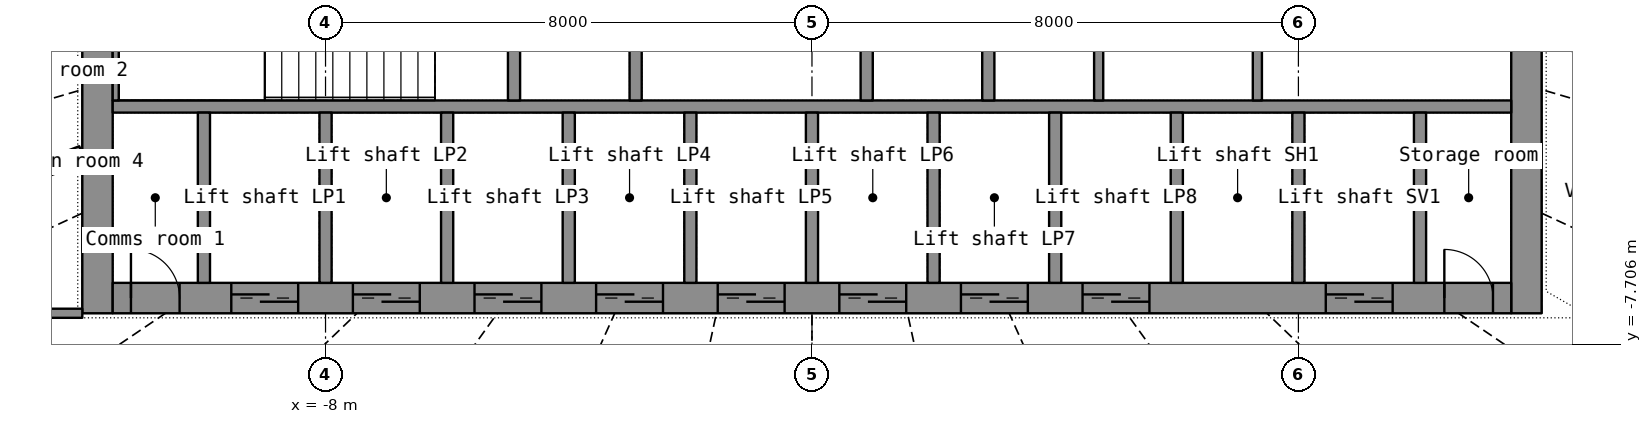
"""IFC4 building model, lengths in metres.
Left out: names, types, materials, properties, quantities, classifications, styles, units other than length and angle.
Written with IfcOpenShell. Run it as: python <this file> out.ifc"""

import sys

from ifc_helpers import new_model, si_unit, direction, frame, frame_2d, origin, place, context, subcontext, project, spatial, rectangle, extrude, element, fill, save


model = new_model("IFC4")
c1 = context("Model", 3, precision=1e-05, world=origin(), true_north=direction((0.0, 1.0)))
c2 = subcontext(c1, "Body", "Model", "MODEL_VIEW")
j1 = project(units=[si_unit("LENGTHUNIT", "METRE"), si_unit("PLANEANGLEUNIT", "RADIAN")], contexts=[c1])
p1 = place(None, origin())
s1 = spatial("IfcSite", under=j1, at=p1, CompositionType="ELEMENT")
p2 = place(p1, origin())
s2 = spatial("IfcBuilding", under=s1, at=p2, CompositionType="ELEMENT")
p3 = place(p2, frame((0.0, 0.0, 134.1)))
s3 = spatial("IfcBuildingStorey", under=s2, at=p3, CompositionType="ELEMENT", Elevation=134.1)
p4 = place(p3, frame((-11.75, -7.2, 0.0), z_axis=(0.0, 0.0, 1.0), x_axis=(0.0, 1.0, 0.0)))
e1 = element("IfcWall", 1, at=p4, inside=s3, PredefinedType="SHEAR", context=c2, shape_type="SweptSolid", body=[
    extrude(rectangle(XDim=14.4, YDim=0.5, at=frame_2d((7.2, 0.0))), origin(), (0.0, 0.0, 1.0), 3.3),
])
p5 = place(p4, frame((6.5, 0.0, 0.0)))
e2 = element("IfcOpeningElement", 2, at=p5, cuts=e1, PredefinedType="OPENING", context=c2, shape_type="SweptSolid", body=[
    extrude(rectangle(XDim=1.4, YDim=2.2, at=frame_2d((0.7, 1.1))), frame((0.0, 0.26, 0.0), z_axis=(0.0, -1.0, 0.0), x_axis=(1.0, 0.0, 0.0)), (0.0, 0.0, 1.0), 0.52),
])
p6 = place(p3, frame((11.75, -7.2, 0.0), z_axis=(0.0, 0.0, 1.0), x_axis=(0.0, 1.0, 0.0)))
e3 = element("IfcWall", 3, at=p6, inside=s3, PredefinedType="SHEAR", context=c2, shape_type="SweptSolid", body=[
    extrude(rectangle(XDim=14.4, YDim=0.5, at=frame_2d((7.2, 0.0))), origin(), (0.0, 0.0, 1.0), 3.3),
])
p7 = place(p6, frame((6.5, 0.0, 0.0)))
e4 = element("IfcOpeningElement", 4, at=p7, cuts=e3, PredefinedType="OPENING", context=c2, shape_type="SweptSolid", body=[
    extrude(rectangle(XDim=1.4, YDim=2.2, at=frame_2d((0.7, 1.1))), frame((0.0, 0.26, 0.0), z_axis=(0.0, -1.0, 0.0), x_axis=(1.0, 0.0, 0.0)), (0.0, 0.0, 1.0), 0.52),
])
p8 = place(p3, frame((-11.5, -6.95, 0.0), z_axis=(0.0, 0.0, 1.0), x_axis=(1.0, 0.0, 0.0)))
e5 = element("IfcWall", 5, at=p8, inside=s3, PredefinedType="SHEAR", context=c2, shape_type="SweptSolid", body=[
    extrude(rectangle(XDim=23.0, YDim=0.5, at=frame_2d((11.5, 0.0))), origin(), (0.0, 0.0, 1.0), 3.3),
])
p9 = place(p8, frame((1.95, 0.0, 0.0)))
e6 = element("IfcOpeningElement", 6, at=p9, cuts=e5, PredefinedType="OPENING", context=c2, shape_type="SweptSolid", body=[
    extrude(rectangle(XDim=1.1, YDim=2.2, at=frame_2d((0.55, 1.1))), frame((0.0, 0.26, 0.0), z_axis=(0.0, -1.0, 0.0), x_axis=(1.0, 0.0, 0.0)), (0.0, 0.0, 1.0), 0.52),
])
p10 = place(p8, frame((3.95, 0.0, 0.0)))
e7 = element("IfcOpeningElement", 7, at=p10, cuts=e5, PredefinedType="OPENING", context=c2, shape_type="SweptSolid", body=[
    extrude(rectangle(XDim=1.1, YDim=2.2, at=frame_2d((0.55, 1.1))), frame((0.0, 0.26, 0.0), z_axis=(0.0, -1.0, 0.0), x_axis=(1.0, 0.0, 0.0)), (0.0, 0.0, 1.0), 0.52),
])
p11 = place(p8, frame((5.95, 0.0, 0.0)))
e8 = element("IfcOpeningElement", 8, at=p11, cuts=e5, PredefinedType="OPENING", context=c2, shape_type="SweptSolid", body=[
    extrude(rectangle(XDim=1.1, YDim=2.2, at=frame_2d((0.55, 1.1))), frame((0.0, 0.26, 0.0), z_axis=(0.0, -1.0, 0.0), x_axis=(1.0, 0.0, 0.0)), (0.0, 0.0, 1.0), 0.52),
])
p12 = place(p8, frame((7.95, 0.0, 0.0)))
e9 = element("IfcOpeningElement", 9, at=p12, cuts=e5, PredefinedType="OPENING", context=c2, shape_type="SweptSolid", body=[
    extrude(rectangle(XDim=1.1, YDim=2.2, at=frame_2d((0.55, 1.1))), frame((0.0, 0.26, 0.0), z_axis=(0.0, -1.0, 0.0), x_axis=(1.0, 0.0, 0.0)), (0.0, 0.0, 1.0), 0.52),
])
p13 = place(p8, frame((9.95, 0.0, 0.0)))
e10 = element("IfcOpeningElement", 10, at=p13, cuts=e5, PredefinedType="OPENING", context=c2, shape_type="SweptSolid", body=[
    extrude(rectangle(XDim=1.1, YDim=2.2, at=frame_2d((0.55, 1.1))), frame((0.0, 0.26, 0.0), z_axis=(0.0, -1.0, 0.0), x_axis=(1.0, 0.0, 0.0)), (0.0, 0.0, 1.0), 0.52),
])
p14 = place(p8, frame((11.95, 0.0, 0.0)))
e11 = element("IfcOpeningElement", 11, at=p14, cuts=e5, PredefinedType="OPENING", context=c2, shape_type="SweptSolid", body=[
    extrude(rectangle(XDim=1.1, YDim=2.2, at=frame_2d((0.55, 1.1))), frame((0.0, 0.26, 0.0), z_axis=(0.0, -1.0, 0.0), x_axis=(1.0, 0.0, 0.0)), (0.0, 0.0, 1.0), 0.52),
])
p15 = place(p8, frame((13.95, 0.0, 0.0)))
e12 = element("IfcOpeningElement", 12, at=p15, cuts=e5, PredefinedType="OPENING", context=c2, shape_type="SweptSolid", body=[
    extrude(rectangle(XDim=1.1, YDim=2.2, at=frame_2d((0.55, 1.1))), frame((0.0, 0.26, 0.0), z_axis=(0.0, -1.0, 0.0), x_axis=(1.0, 0.0, 0.0)), (0.0, 0.0, 1.0), 0.52),
])
p16 = place(p8, frame((15.95, 0.0, 0.0)))
e13 = element("IfcOpeningElement", 13, at=p16, cuts=e5, PredefinedType="OPENING", context=c2, shape_type="SweptSolid", body=[
    extrude(rectangle(XDim=1.1, YDim=2.2, at=frame_2d((0.55, 1.1))), frame((0.0, 0.26, 0.0), z_axis=(0.0, -1.0, 0.0), x_axis=(1.0, 0.0, 0.0)), (0.0, 0.0, 1.0), 0.52),
])
p17 = place(p8, frame((19.95, 0.0, 0.0)))
e14 = element("IfcOpeningElement", 14, at=p17, cuts=e5, PredefinedType="OPENING", context=c2, shape_type="SweptSolid", body=[
    extrude(rectangle(XDim=1.1, YDim=2.2, at=frame_2d((0.55, 1.1))), frame((0.0, 0.26, 0.0), z_axis=(0.0, -1.0, 0.0), x_axis=(1.0, 0.0, 0.0)), (0.0, 0.0, 1.0), 0.52),
])
p18 = place(p8, frame((0.3, 0.0, 0.0)))
e15 = element("IfcOpeningElement", 15, at=p18, cuts=e5, PredefinedType="OPENING", context=c2, shape_type="SweptSolid", body=[
    extrude(rectangle(XDim=0.8, YDim=2.05, at=frame_2d((0.4, 1.025))), frame((0.0, 0.26, 0.0), z_axis=(0.0, -1.0, 0.0), x_axis=(1.0, 0.0, 0.0)), (0.0, 0.0, 1.0), 0.52),
])
p19 = place(p8, frame((21.9, 0.0, 0.0)))
e16 = element("IfcOpeningElement", 16, at=p19, cuts=e5, PredefinedType="OPENING", context=c2, shape_type="SweptSolid", body=[
    extrude(rectangle(XDim=0.8, YDim=2.05, at=frame_2d((0.4, 1.025))), frame((0.0, 0.26, 0.0), z_axis=(0.0, -1.0, 0.0), x_axis=(1.0, 0.0, 0.0)), (0.0, 0.0, 1.0), 0.52),
])
p20 = place(p3, frame((-11.5, -3.8, 0.0), z_axis=(0.0, 0.0, 1.0), x_axis=(1.0, 0.0, 0.0)))
e17 = element("IfcWall", 17, at=p20, inside=s3, PredefinedType="SHEAR", context=c2, shape_type="SweptSolid", body=[
    extrude(rectangle(XDim=23.0, YDim=0.2, at=frame_2d((11.5, 0.0))), origin(), (0.0, 0.0, 1.0), 3.3),
])
for number, where, z_axis, x_axis in (
    (18, (-10.0, -6.7, 0.0), (0.0, 0.0, 1.0), (0.0, 1.0, 0.0)),
    (19, (-8.0, -6.7, 0.0), (0.0, 0.0, 1.0), (0.0, 1.0, 0.0)),
    (20, (-6.0, -6.7, 0.0), (0.0, 0.0, 1.0), (0.0, 1.0, 0.0)),
    (21, (-4.0, -6.7, 0.0), (0.0, 0.0, 1.0), (0.0, 1.0, 0.0)),
    (22, (-2.0, -6.7, 0.0), (0.0, 0.0, 1.0), (0.0, 1.0, 0.0)),
    (23, (0.0, -6.7, 0.0), (0.0, 0.0, 1.0), (0.0, 1.0, 0.0)),
    (24, (2.0, -6.7, 0.0), (0.0, 0.0, 1.0), (0.0, 1.0, 0.0)),
    (25, (4.0, -6.7, 0.0), (0.0, 0.0, 1.0), (0.0, 1.0, 0.0)),
    (26, (6.0, -6.7, 0.0), (0.0, 0.0, 1.0), (0.0, 1.0, 0.0)),
    (27, (8.0, -6.7, 0.0), (0.0, 0.0, 1.0), (0.0, 1.0, 0.0)),
    (28, (10.0, -6.7, 0.0), (0.0, 0.0, 1.0), (0.0, 1.0, 0.0)),
):
    element("IfcWall", number, at=place(p3, frame(where, z_axis=z_axis, x_axis=x_axis)), inside=s3, PredefinedType="SHEAR", context=c2, shape_type="SweptSolid", body=[
        extrude(rectangle(XDim=2.8, YDim=0.2, at=frame_2d((1.4, 0.0))), origin(), (0.0, 0.0, 1.0), 3.3),
    ])
p21 = place(p3, frame((-2.9, -3.7, 0.0), z_axis=(0.0, 0.0, 1.0), x_axis=(0.0, 1.0, 0.0)))
e29 = element("IfcWall", 29, at=p21, inside=s3, PredefinedType="SHEAR", context=c2, shape_type="SweptSolid", body=[
    extrude(rectangle(XDim=7.4, YDim=0.2, at=frame_2d((3.7, 0.0))), origin(), (0.0, 0.0, 1.0), 3.3),
])
p22 = place(p21, frame((3.1, 0.0, 0.0)))
e30 = element("IfcOpeningElement", 30, at=p22, cuts=e29, PredefinedType="OPENING", context=c2, shape_type="SweptSolid", body=[
    extrude(rectangle(XDim=1.2, YDim=2.2, at=frame_2d((0.6, 1.1))), frame((0.0, 0.11, 0.0), z_axis=(0.0, -1.0, 0.0), x_axis=(1.0, 0.0, 0.0)), (0.0, 0.0, 1.0), 0.22),
])
p23 = place(p3, frame((2.9, -3.7, 0.0), z_axis=(0.0, 0.0, 1.0), x_axis=(0.0, 1.0, 0.0)))
e31 = element("IfcWall", 31, at=p23, inside=s3, PredefinedType="SHEAR", context=c2, shape_type="SweptSolid", body=[
    extrude(rectangle(XDim=7.4, YDim=0.2, at=frame_2d((3.7, 0.0))), origin(), (0.0, 0.0, 1.0), 3.3),
])
p24 = place(p23, frame((3.1, 0.0, 0.0)))
e32 = element("IfcOpeningElement", 32, at=p24, cuts=e31, PredefinedType="OPENING", context=c2, shape_type="SweptSolid", body=[
    extrude(rectangle(XDim=1.2, YDim=2.2, at=frame_2d((0.6, 1.1))), frame((0.0, 0.11, 0.0), z_axis=(0.0, -1.0, 0.0), x_axis=(1.0, 0.0, 0.0)), (0.0, 0.0, 1.0), 0.22),
])
p25 = place(p3, frame((0.9, -3.7, 0.0), z_axis=(0.0, 0.0, 1.0), x_axis=(0.0, 1.0, 0.0)))
e33 = element("IfcWall", 33, at=p25, inside=s3, PredefinedType="SHEAR", context=c2, shape_type="SweptSolid", body=[
    extrude(rectangle(XDim=2.35, YDim=0.2, at=frame_2d((1.175, 0.0))), origin(), (0.0, 0.0, 1.0), 3.3),
])
p26 = place(p3, frame((-11.45, -3.7, 0.0), z_axis=(0.0, 0.0, 1.0), x_axis=(0.0, 1.0, 0.0)))
e34 = element("IfcWall", 34, at=p26, inside=s3, PredefinedType="SHEAR", context=c2, shape_type="SweptSolid", body=[
    extrude(rectangle(XDim=2.35, YDim=0.1, at=frame_2d((1.175, 0.0))), origin(), (0.0, 0.0, 1.0), 3.3),
])
p27 = place(p3, frame((-4.9, -3.7, 0.0), z_axis=(0.0, 0.0, 1.0), x_axis=(0.0, 1.0, 0.0)))
e35 = element("IfcWall", 35, at=p27, inside=s3, PredefinedType="SHEAR", context=c2, shape_type="SweptSolid", body=[
    extrude(rectangle(XDim=2.35, YDim=0.2, at=frame_2d((1.175, 0.0))), origin(), (0.0, 0.0, 1.0), 3.3),
])
for number, where, z_axis, x_axis in (
    (36, (4.715, -3.7, 0.0), (0.0, 0.0, 1.0), (0.0, 1.0, 0.0)),
    (37, (7.325, -3.7, 0.0), (0.0, 0.0, 1.0), (0.0, 1.0, 0.0)),
):
    element("IfcWall", number, at=place(p3, frame(where, z_axis=z_axis, x_axis=x_axis)), inside=s3, PredefinedType="PARTITIONING", context=c2, shape_type="SweptSolid", body=[
        extrude(rectangle(XDim=2.35, YDim=0.15, at=frame_2d((1.175, 0.0))), origin(), (0.0, 0.0, 1.0), 3.3),
    ])
p28 = place(p3, frame((-15.873, -6.063, 0.0), z_axis=(0.0, 0.0, 1.0), x_axis=(0.934170215, 0.356827703, 0.0)))
e38 = element("IfcWall", 38, at=p28, inside=s3, PredefinedType="PARTITIONING", context=c2, shape_type="SweptSolid", body=[
    extrude(rectangle(XDim=4.146, YDim=0.28, at=frame_2d((2.073, 0.0))), origin(), (0.0, 0.0, 1.0), 2.4),
])
p29 = place(p28, frame((1.323, 0.0, 1.0)))
e39 = element("IfcOpeningElement", 39, at=p29, cuts=e38, PredefinedType="OPENING", context=c2, shape_type="SweptSolid", body=[
    extrude(rectangle(XDim=1.5, YDim=1.2, at=frame_2d((0.75, 0.6))), frame((0.0, 0.15, 0.0), z_axis=(0.0, -1.0, 0.0), x_axis=(1.0, 0.0, 0.0)), (0.0, 0.0, 1.0), 0.3),
])
p30 = place(p3, frame((16.0, -3.512, 0.0), z_axis=(0.0, 0.0, 1.0), x_axis=(-0.976750433, 0.214379551, 0.0)))
e40 = element("IfcWall", 40, at=p30, inside=s3, PredefinedType="PARTITIONING", context=c2, shape_type="SweptSolid", body=[
    extrude(rectangle(XDim=4.095, YDim=0.28, at=frame_2d((2.048, 0.0))), origin(), (0.0, 0.0, 1.0), 2.4),
])
p31 = place(p30, frame((1.298, 0.0, 1.0)))
e41 = element("IfcOpeningElement", 41, at=p31, cuts=e40, PredefinedType="OPENING", context=c2, shape_type="SweptSolid", body=[
    extrude(rectangle(XDim=1.5, YDim=1.2, at=frame_2d((0.75, 0.6))), frame((0.0, 0.15, 0.0), z_axis=(0.0, -1.0, 0.0), x_axis=(1.0, 0.0, 0.0)), (0.0, 0.0, 1.0), 0.3),
])
p32 = place(p3, frame((-12.0, -7.2, 0.0), z_axis=(0.0, 0.0, 1.0), x_axis=(-1.0, 0.0, 0.0)))
e42 = element("IfcWall", 42, at=p32, inside=s3, PredefinedType="PARTITIONING", context=c2, shape_type="SweptSolid", body=[
    extrude(rectangle(XDim=4.0, YDim=0.15, at=frame_2d((2.0, 0.0))), origin(), (0.0, 0.0, 1.0), 2.4),
])
p33 = place(p32, frame((1.5, 0.0, 0.0)))
e43 = element("IfcOpeningElement", 43, at=p33, cuts=e42, PredefinedType="OPENING", context=c2, shape_type="SweptSolid", body=[
    extrude(rectangle(XDim=1.0, YDim=2.2, at=frame_2d((0.5, 1.1))), frame((0.0, 0.085, 0.0), z_axis=(0.0, -1.0, 0.0), x_axis=(1.0, 0.0, 0.0)), (0.0, 0.0, 1.0), 0.17),
])
p34 = place(p9, origin())
e44 = element("IfcDoor", 44, at=p34, inside=s3, OperationType="DOUBLE_DOOR_SLIDING", PredefinedType="DOOR", context=c2, shape_type="SweptSolid", body=[
    extrude(rectangle(XDim=1.1, YDim=2.2, at=frame_2d((0.55, 1.1))), frame((0.0, 0.025, 0.0), z_axis=(0.0, -1.0, 0.0), x_axis=(1.0, 0.0, 0.0)), (0.0, 0.0, 1.0), 0.05),
])
fill(e6, e44)
p35 = place(p10, origin())
e45 = element("IfcDoor", 45, at=p35, inside=s3, OperationType="DOUBLE_DOOR_SLIDING", PredefinedType="DOOR", context=c2, shape_type="SweptSolid", body=[
    extrude(rectangle(XDim=1.1, YDim=2.2, at=frame_2d((0.55, 1.1))), frame((0.0, 0.025, 0.0), z_axis=(0.0, -1.0, 0.0), x_axis=(1.0, 0.0, 0.0)), (0.0, 0.0, 1.0), 0.05),
])
fill(e7, e45)
p36 = place(p11, origin())
e46 = element("IfcDoor", 46, at=p36, inside=s3, OperationType="DOUBLE_DOOR_SLIDING", PredefinedType="DOOR", context=c2, shape_type="SweptSolid", body=[
    extrude(rectangle(XDim=1.1, YDim=2.2, at=frame_2d((0.55, 1.1))), frame((0.0, 0.025, 0.0), z_axis=(0.0, -1.0, 0.0), x_axis=(1.0, 0.0, 0.0)), (0.0, 0.0, 1.0), 0.05),
])
fill(e8, e46)
p37 = place(p12, origin())
e47 = element("IfcDoor", 47, at=p37, inside=s3, OperationType="DOUBLE_DOOR_SLIDING", PredefinedType="DOOR", context=c2, shape_type="SweptSolid", body=[
    extrude(rectangle(XDim=1.1, YDim=2.2, at=frame_2d((0.55, 1.1))), frame((0.0, 0.025, 0.0), z_axis=(0.0, -1.0, 0.0), x_axis=(1.0, 0.0, 0.0)), (0.0, 0.0, 1.0), 0.05),
])
fill(e9, e47)
p38 = place(p13, origin())
e48 = element("IfcDoor", 48, at=p38, inside=s3, OperationType="DOUBLE_DOOR_SLIDING", PredefinedType="DOOR", context=c2, shape_type="SweptSolid", body=[
    extrude(rectangle(XDim=1.1, YDim=2.2, at=frame_2d((0.55, 1.1))), frame((0.0, 0.025, 0.0), z_axis=(0.0, -1.0, 0.0), x_axis=(1.0, 0.0, 0.0)), (0.0, 0.0, 1.0), 0.05),
])
fill(e10, e48)
p39 = place(p14, origin())
e49 = element("IfcDoor", 49, at=p39, inside=s3, OperationType="DOUBLE_DOOR_SLIDING", PredefinedType="DOOR", context=c2, shape_type="SweptSolid", body=[
    extrude(rectangle(XDim=1.1, YDim=2.2, at=frame_2d((0.55, 1.1))), frame((0.0, 0.025, 0.0), z_axis=(0.0, -1.0, 0.0), x_axis=(1.0, 0.0, 0.0)), (0.0, 0.0, 1.0), 0.05),
])
fill(e11, e49)
p40 = place(p15, origin())
e50 = element("IfcDoor", 50, at=p40, inside=s3, OperationType="DOUBLE_DOOR_SLIDING", PredefinedType="DOOR", context=c2, shape_type="SweptSolid", body=[
    extrude(rectangle(XDim=1.1, YDim=2.2, at=frame_2d((0.55, 1.1))), frame((0.0, 0.025, 0.0), z_axis=(0.0, -1.0, 0.0), x_axis=(1.0, 0.0, 0.0)), (0.0, 0.0, 1.0), 0.05),
])
fill(e12, e50)
p41 = place(p16, origin())
e51 = element("IfcDoor", 51, at=p41, inside=s3, OperationType="DOUBLE_DOOR_SLIDING", PredefinedType="DOOR", context=c2, shape_type="SweptSolid", body=[
    extrude(rectangle(XDim=1.1, YDim=2.2, at=frame_2d((0.55, 1.1))), frame((0.0, 0.025, 0.0), z_axis=(0.0, -1.0, 0.0), x_axis=(1.0, 0.0, 0.0)), (0.0, 0.0, 1.0), 0.05),
])
fill(e13, e51)
p42 = place(p17, origin())
e52 = element("IfcDoor", 52, at=p42, inside=s3, OperationType="DOUBLE_DOOR_SLIDING", PredefinedType="DOOR", context=c2, shape_type="SweptSolid", body=[
    extrude(rectangle(XDim=1.1, YDim=2.2, at=frame_2d((0.55, 1.1))), frame((0.0, 0.025, 0.0), z_axis=(0.0, -1.0, 0.0), x_axis=(1.0, 0.0, 0.0)), (0.0, 0.0, 1.0), 0.05),
])
fill(e14, e52)
p43 = place(p18, origin())
e53 = element("IfcDoor", 53, at=p43, inside=s3, OperationType="SINGLE_SWING_LEFT", PredefinedType="DOOR", context=c2, shape_type="SweptSolid", body=[
    extrude(rectangle(XDim=0.8, YDim=2.05, at=frame_2d((0.4, 1.025))), frame((0.0, 0.025, 0.0), z_axis=(0.0, -1.0, 0.0), x_axis=(1.0, 0.0, 0.0)), (0.0, 0.0, 1.0), 0.05),
])
fill(e15, e53)
p44 = place(p19, origin())
e54 = element("IfcDoor", 54, at=p44, inside=s3, OperationType="SINGLE_SWING_LEFT", PredefinedType="DOOR", context=c2, shape_type="SweptSolid", body=[
    extrude(rectangle(XDim=0.8, YDim=2.05, at=frame_2d((0.4, 1.025))), frame((0.0, 0.025, 0.0), z_axis=(0.0, -1.0, 0.0), x_axis=(1.0, 0.0, 0.0)), (0.0, 0.0, 1.0), 0.05),
])
fill(e16, e54)
save(model, sys.argv[1])
